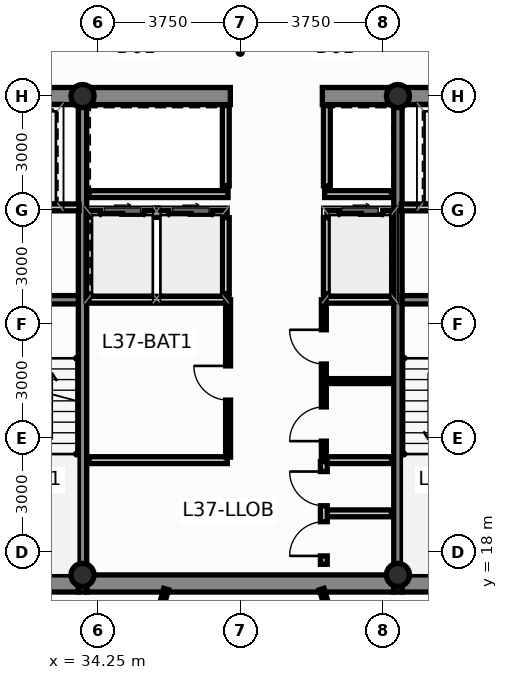
"""IFC4 building model, lengths in metres.
Left out: names, types, materials, properties, quantities, classifications, styles, units other than length and angle.
Written with IfcOpenShell. Run it as: python <this file> out.ifc"""

import sys

from ifc_helpers import new_model, si_unit, direction, frame, frame_2d, origin, origin_2d, place, context, subcontext, project, spatial, rectangle, hollow_circle, extrude, source, transform, mapped, element, fill, save


model = new_model("IFC4")
c1 = context("Model", 3, precision=1e-05, world=origin(), true_north=direction((0.0, 1.0)))
c2 = subcontext(c1, "Body", "Model", "MODEL_VIEW")
j1 = project(units=[si_unit("LENGTHUNIT", "METRE"), si_unit("PLANEANGLEUNIT", "RADIAN")], contexts=[c1])
p1 = place(None, origin())
s1 = spatial("IfcSite", under=j1, at=p1, CompositionType="ELEMENT")
p2 = place(p1, origin())
s2 = spatial("IfcBuilding", under=s1, at=p2, CompositionType="ELEMENT")
p3 = place(p2, frame((0.0, 0.0, 142.75)))
s3 = spatial("IfcBuildingStorey", under=s2, at=p3, CompositionType="ELEMENT", Elevation=142.75)
m1 = source(origin(), c2, "Body", "SweptSolid", [
    extrude(hollow_circle(Radius=0.305, WallThickness=0.025, at=origin_2d()), origin(), (0.0, 0.0, 1.0), 3.65),
])
for number, where, z_axis, x_axis in (
    (1, (33.85, 17.4, 0.0), (0.0, 0.0, 1.0), (1.0, 0.0, 0.0)),
    (2, (42.15, 17.4, 0.0), (0.0, 0.0, 1.0), (1.0, 0.0, 0.0)),
    (3, (33.85, 30.0, 0.0), (0.0, 0.0, 1.0), (1.0, 0.0, 0.0)),
    (4, (42.15, 30.0, 0.0), (0.0, 0.0, 1.0), (1.0, 0.0, 0.0)),
):
    element("IfcColumn", number, at=place(p3, frame(where, z_axis=z_axis, x_axis=x_axis)), inside=s3, PredefinedType="COLUMN", context=c2, shape_type="MappedRepresentation", body=[
        mapped(m1, transform((0.0, 0.0, 0.0), scale=1.0)),
    ])
p4 = place(p3, frame((30.84, 17.175, 0.0), z_axis=(0.0, 0.0, 1.0), x_axis=(1.0, 0.0, 0.0)))
e5 = element("IfcWall", 5, at=p4, inside=s3, PredefinedType="SHEAR", context=c2, shape_type="SweptSolid", body=[
    extrude(rectangle(XDim=2.9, YDim=0.45, at=frame_2d((1.45, 0.0))), origin(), (0.0, 0.0, 1.0), 3.65),
])
p5 = place(p3, frame((33.96, 17.175, 0.0), z_axis=(0.0, 0.0, 1.0), x_axis=(1.0, 0.0, 0.0)))
e6 = element("IfcWall", 6, at=p5, inside=s3, PredefinedType="SHEAR", context=c2, shape_type="SweptSolid", body=[
    extrude(rectangle(XDim=8.08, YDim=0.45, at=frame_2d((4.04, 0.0))), origin(), (0.0, 0.0, 1.0), 3.65),
])
for number, where, z_axis, x_axis in (
    (7, (42.26, 17.175, 0.0), (0.0, 0.0, 1.0), (1.0, 0.0, 0.0)),
    (8, (30.84, 30.0, 0.0), (0.0, 0.0, 1.0), (1.0, 0.0, 0.0)),
):
    element("IfcWall", number, at=place(p3, frame(where, z_axis=z_axis, x_axis=x_axis)), inside=s3, PredefinedType="SHEAR", context=c2, shape_type="SweptSolid", body=[
        extrude(rectangle(XDim=2.9, YDim=0.45, at=frame_2d((1.45, 0.0))), origin(), (0.0, 0.0, 1.0), 3.65),
    ])
p6 = place(p3, frame((33.96, 30.0, 0.0), z_axis=(0.0, 0.0, 1.0), x_axis=(1.0, 0.0, 0.0)))
e9 = element("IfcWall", 9, at=p6, inside=s3, PredefinedType="SHEAR", context=c2, shape_type="SweptSolid", body=[
    extrude(rectangle(XDim=3.78, YDim=0.45, at=frame_2d((1.89, 0.0))), origin(), (0.0, 0.0, 1.0), 3.65),
])
p7 = place(p3, frame((40.16, 30.0, 0.0), z_axis=(0.0, 0.0, 1.0), x_axis=(1.0, 0.0, 0.0)))
e10 = element("IfcWall", 10, at=p7, inside=s3, PredefinedType="SHEAR", context=c2, shape_type="SweptSolid", body=[
    extrude(rectangle(XDim=1.88, YDim=0.45, at=frame_2d((0.94, 0.0))), origin(), (0.0, 0.0, 1.0), 3.65),
])
p8 = place(p3, frame((42.26, 30.0, 0.0), z_axis=(0.0, 0.0, 1.0), x_axis=(1.0, 0.0, 0.0)))
e11 = element("IfcWall", 11, at=p8, inside=s3, PredefinedType="SHEAR", context=c2, shape_type="SweptSolid", body=[
    extrude(rectangle(XDim=2.9, YDim=0.45, at=frame_2d((1.45, 0.0))), origin(), (0.0, 0.0, 1.0), 3.65),
])
for number, where, z_axis, x_axis in (
    (12, (33.85, 16.95, 0.0), (0.0, 0.0, 1.0), (0.0, 1.0, 0.0)),
    (13, (42.15, 16.95, 0.0), (0.0, 0.0, 1.0), (0.0, 1.0, 0.0)),
):
    element("IfcWall", number, at=place(p3, frame(where, z_axis=z_axis, x_axis=x_axis)), inside=s3, PredefinedType="SHEAR", context=c2, shape_type="SweptSolid", body=[
        extrude(rectangle(XDim=13.275, YDim=0.22, at=frame_2d((6.638, 0.0))), origin(), (0.0, 0.0, 1.0), 3.65),
    ])
for number, where, z_axis, x_axis in (
    (14, (30.84, 24.64, 0.0), (0.0, 0.0, 1.0), (1.0, 0.0, 0.0)),
    (15, (42.26, 24.64, 0.0), (0.0, 0.0, 1.0), (1.0, 0.0, 0.0)),
):
    element("IfcWall", number, at=place(p3, frame(where, z_axis=z_axis, x_axis=x_axis)), inside=s3, PredefinedType="SHEAR", context=c2, shape_type="SweptSolid", body=[
        extrude(rectangle(XDim=2.9, YDim=0.22, at=frame_2d((1.45, 0.0))), origin(), (0.0, 0.0, 1.0), 3.65),
    ])
p9 = place(p3, frame((34.02, 26.9, 0.0), z_axis=(0.0, 0.0, 1.0), x_axis=(1.0, 0.0, 0.0)))
e16 = element("IfcWall", 16, at=p9, inside=s3, PredefinedType="PARTITIONING", context=c2, shape_type="SweptSolid", body=[
    extrude(rectangle(XDim=3.6, YDim=0.18, at=frame_2d((1.8, 0.0))), origin(), (0.0, 0.0, 1.0), 3.4),
])
p10 = place(p9, frame((0.3, 0.0, 0.0)))
e17 = element("IfcOpeningElement", 17, at=p10, cuts=e16, PredefinedType="OPENING", context=c2, shape_type="SweptSolid", body=[
    extrude(rectangle(XDim=1.15, YDim=2.2, at=frame_2d((0.575, 1.1))), frame((0.0, 0.102, 0.0), z_axis=(0.0, -1.0, 0.0), x_axis=(1.0, 0.0, 0.0)), (0.0, 0.0, 1.0), 0.204),
])
p11 = place(p9, frame((2.1, 0.0, 0.0)))
e18 = element("IfcOpeningElement", 18, at=p11, cuts=e16, PredefinedType="OPENING", context=c2, shape_type="SweptSolid", body=[
    extrude(rectangle(XDim=1.15, YDim=2.2, at=frame_2d((0.575, 1.1))), frame((0.0, 0.102, 0.0), z_axis=(0.0, -1.0, 0.0), x_axis=(1.0, 0.0, 0.0)), (0.0, 0.0, 1.0), 0.204),
])
p12 = place(p3, frame((40.28, 26.9, 0.0), z_axis=(0.0, 0.0, 1.0), x_axis=(1.0, 0.0, 0.0)))
e19 = element("IfcWall", 19, at=p12, inside=s3, PredefinedType="PARTITIONING", context=c2, shape_type="SweptSolid", body=[
    extrude(rectangle(XDim=1.7, YDim=0.18, at=frame_2d((0.85, 0.0))), origin(), (0.0, 0.0, 1.0), 3.4),
])
p13 = place(p12, frame((0.32, 0.0, 0.0)))
e20 = element("IfcOpeningElement", 20, at=p13, cuts=e19, PredefinedType="OPENING", context=c2, shape_type="SweptSolid", body=[
    extrude(rectangle(XDim=1.15, YDim=2.2, at=frame_2d((0.575, 1.1))), frame((0.0, 0.102, 0.0), z_axis=(0.0, -1.0, 0.0), x_axis=(1.0, 0.0, 0.0)), (0.0, 0.0, 1.0), 0.204),
])
for number, where, z_axis, x_axis in (
    (21, (37.62, 24.8, 0.0), (0.0, 0.0, 1.0), (0.0, 1.0, 0.0)),
    (22, (40.28, 24.8, 0.0), (0.0, 0.0, 1.0), (0.0, 1.0, 0.0)),
):
    element("IfcWall", number, at=place(p3, frame(where, z_axis=z_axis, x_axis=x_axis)), inside=s3, PredefinedType="PARTITIONING", context=c2, shape_type="SweptSolid", body=[
        extrude(rectangle(XDim=2.0, YDim=0.18, at=frame_2d((1.0, 0.0))), origin(), (0.0, 0.0, 1.0), 3.4),
    ])
p14 = place(p3, frame((34.02, 24.64, 0.0), z_axis=(0.0, 0.0, 1.0), x_axis=(1.0, 0.0, 0.0)))
e23 = element("IfcWall", 23, at=p14, inside=s3, PredefinedType="PARTITIONING", context=c2, shape_type="SweptSolid", body=[
    extrude(rectangle(XDim=3.68, YDim=0.18, at=frame_2d((1.84, 0.0))), origin(), (0.0, 0.0, 1.0), 3.4),
])
p15 = place(p3, frame((40.2, 24.64, 0.0), z_axis=(0.0, 0.0, 1.0), x_axis=(1.0, 0.0, 0.0)))
e24 = element("IfcWall", 24, at=p15, inside=s3, PredefinedType="PARTITIONING", context=c2, shape_type="SweptSolid", body=[
    extrude(rectangle(XDim=1.78, YDim=0.18, at=frame_2d((0.89, 0.0))), origin(), (0.0, 0.0, 1.0), 3.4),
])
p16 = place(p3, frame((34.02, 27.42, 0.0), z_axis=(0.0, 0.0, 1.0), x_axis=(1.0, 0.0, 0.0)))
e25 = element("IfcWall", 25, at=p16, inside=s3, PredefinedType="PARTITIONING", context=c2, shape_type="SweptSolid", body=[
    extrude(rectangle(XDim=3.66, YDim=0.18, at=frame_2d((1.83, 0.0))), origin(), (0.0, 0.0, 1.0), 3.4),
])
p17 = place(p3, frame((40.22, 27.42, 0.0), z_axis=(0.0, 0.0, 1.0), x_axis=(1.0, 0.0, 0.0)))
e26 = element("IfcWall", 26, at=p17, inside=s3, PredefinedType="PARTITIONING", context=c2, shape_type="SweptSolid", body=[
    extrude(rectangle(XDim=1.76, YDim=0.18, at=frame_2d((0.88, 0.0))), origin(), (0.0, 0.0, 1.0), 3.4),
])
for number, where, z_axis, x_axis in (
    (27, (37.62, 27.64, 0.0), (0.0, 0.0, 1.0), (0.0, 1.0, 0.0)),
    (28, (40.28, 27.64, 0.0), (0.0, 0.0, 1.0), (0.0, 1.0, 0.0)),
):
    element("IfcWall", number, at=place(p3, frame(where, z_axis=z_axis, x_axis=x_axis)), inside=s3, PredefinedType="PARTITIONING", context=c2, shape_type="SweptSolid", body=[
        extrude(rectangle(XDim=2.11, YDim=0.18, at=frame_2d((1.055, 0.0))), origin(), (0.0, 0.0, 1.0), 3.4),
    ])
for number, where, z_axis, x_axis in (
    (29, (30.86, 27.07, 0.0), (0.0, 0.0, 1.0), (1.0, 0.0, 0.0)),
    (30, (42.24, 27.07, 0.0), (0.0, 0.0, 1.0), (1.0, 0.0, 0.0)),
):
    element("IfcWall", number, at=place(p3, frame(where, z_axis=z_axis, x_axis=x_axis)), inside=s3, PredefinedType="PARTITIONING", context=c2, shape_type="SweptSolid", body=[
        extrude(rectangle(XDim=2.9, YDim=0.18, at=frame_2d((1.45, 0.0))), origin(), (0.0, 0.0, 1.0), 3.4),
    ])
p18 = place(p3, frame((34.02, 20.42, 0.0), z_axis=(0.0, 0.0, 1.0), x_axis=(1.0, 0.0, 0.0)))
e31 = element("IfcWall", 31, at=p18, inside=s3, PredefinedType="PARTITIONING", context=c2, shape_type="SweptSolid", body=[
    extrude(rectangle(XDim=3.64, YDim=0.18, at=frame_2d((1.82, 0.0))), origin(), (0.0, 0.0, 1.0), 3.4),
])
p19 = place(p3, frame((40.22, 20.42, 0.0), z_axis=(0.0, 0.0, 1.0), x_axis=(1.0, 0.0, 0.0)))
e32 = element("IfcWall", 32, at=p19, inside=s3, PredefinedType="PARTITIONING", context=c2, shape_type="SweptSolid", body=[
    extrude(rectangle(XDim=1.76, YDim=0.18, at=frame_2d((0.88, 0.0))), origin(), (0.0, 0.0, 1.0), 3.4),
])
p20 = place(p3, frame((40.28, 22.5, 0.0), z_axis=(0.0, 0.0, 1.0), x_axis=(1.0, 0.0, 0.0)))
e33 = element("IfcWall", 33, at=p20, inside=s3, PredefinedType="PARTITIONING", context=c2, shape_type="SweptSolid", body=[
    extrude(rectangle(XDim=1.7, YDim=0.13, at=frame_2d((0.85, 0.0))), origin(), (0.0, 0.0, 1.0), 3.4),
])
p21 = place(p3, frame((37.68, 20.5, 0.0), z_axis=(0.0, 0.0, 1.0), x_axis=(0.0, 1.0, 0.0)))
e34 = element("IfcWall", 34, at=p21, inside=s3, PredefinedType="PARTITIONING", context=c2, shape_type="SweptSolid", body=[
    extrude(rectangle(XDim=4.14, YDim=0.13, at=frame_2d((2.07, 0.0))), origin(), (0.0, 0.0, 1.0), 3.4),
])
p22 = place(p21, frame((1.5, 0.0, 0.0)))
e35 = element("IfcOpeningElement", 35, at=p22, cuts=e34, PredefinedType="OPENING", context=c2, shape_type="SweptSolid", body=[
    extrude(rectangle(XDim=0.9, YDim=2.1, at=frame_2d((0.45, 1.05))), frame((0.0, 0.077, 0.0), z_axis=(0.0, -1.0, 0.0), x_axis=(1.0, 0.0, 0.0)), (0.0, 0.0, 1.0), 0.154),
])
p23 = place(p3, frame((40.2, 20.5, 0.0), z_axis=(0.0, 0.0, 1.0), x_axis=(0.0, 1.0, 0.0)))
e36 = element("IfcWall", 36, at=p23, inside=s3, PredefinedType="PARTITIONING", context=c2, shape_type="SweptSolid", body=[
    extrude(rectangle(XDim=4.14, YDim=0.13, at=frame_2d((2.07, 0.0))), origin(), (0.0, 0.0, 1.0), 3.4),
])
p24 = place(p23, frame((0.42, 0.0, 0.0)))
e37 = element("IfcOpeningElement", 37, at=p24, cuts=e36, PredefinedType="OPENING", context=c2, shape_type="SweptSolid", body=[
    extrude(rectangle(XDim=0.9, YDim=2.1, at=frame_2d((0.45, 1.05))), frame((0.0, 0.077, 0.0), z_axis=(0.0, -1.0, 0.0), x_axis=(1.0, 0.0, 0.0)), (0.0, 0.0, 1.0), 0.154),
])
p25 = place(p23, frame((2.45, 0.0, 0.0)))
e38 = element("IfcOpeningElement", 38, at=p25, cuts=e36, PredefinedType="OPENING", context=c2, shape_type="SweptSolid", body=[
    extrude(rectangle(XDim=0.9, YDim=2.1, at=frame_2d((0.45, 1.05))), frame((0.0, 0.077, 0.0), z_axis=(0.0, -1.0, 0.0), x_axis=(1.0, 0.0, 0.0)), (0.0, 0.0, 1.0), 0.154),
])
p26 = place(p3, frame((40.28, 19.02, 0.0), z_axis=(0.0, 0.0, 1.0), x_axis=(1.0, 0.0, 0.0)))
e39 = element("IfcWall", 39, at=p26, inside=s3, PredefinedType="PARTITIONING", context=c2, shape_type="SweptSolid", body=[
    extrude(rectangle(XDim=1.7, YDim=0.18, at=frame_2d((0.85, 0.0))), origin(), (0.0, 0.0, 1.0), 3.4),
])
p27 = place(p3, frame((40.2, 17.68, 0.0), z_axis=(0.0, 0.0, 1.0), x_axis=(0.0, 1.0, 0.0)))
e40 = element("IfcWall", 40, at=p27, inside=s3, PredefinedType="PARTITIONING", context=c2, shape_type="SweptSolid", body=[
    extrude(rectangle(XDim=2.7, YDim=0.18, at=frame_2d((1.35, 0.0))), origin(), (0.0, 0.0, 1.0), 3.4),
])
p28 = place(p27, frame((0.22, 0.0, 0.0)))
e41 = element("IfcOpeningElement", 41, at=p28, cuts=e40, PredefinedType="OPENING", context=c2, shape_type="SweptSolid", body=[
    extrude(rectangle(XDim=0.9, YDim=2.1, at=frame_2d((0.45, 1.05))), frame((0.0, 0.102, 0.0), z_axis=(0.0, -1.0, 0.0), x_axis=(1.0, 0.0, 0.0)), (0.0, 0.0, 1.0), 0.204),
])
p29 = place(p27, frame((1.54, 0.0, 0.0)))
e42 = element("IfcOpeningElement", 42, at=p29, cuts=e40, PredefinedType="OPENING", context=c2, shape_type="SweptSolid", body=[
    extrude(rectangle(XDim=0.9, YDim=2.1, at=frame_2d((0.45, 1.05))), frame((0.0, 0.102, 0.0), z_axis=(0.0, -1.0, 0.0), x_axis=(1.0, 0.0, 0.0)), (0.0, 0.0, 1.0), 0.204),
])
p30 = place(p3, frame((40.142, 17.028, 0.0), z_axis=(0.0, 0.0, 1.0), x_axis=(0.293775711931, -0.955874380387, 0.0)))
e43 = element("IfcWall", 43, at=p30, inside=s3, PredefinedType="PARTITIONING", context=c2, shape_type="SweptSolid", body=[
    extrude(rectangle(XDim=11.23, YDim=0.13, at=frame_2d((5.615, 0.0))), origin(), (0.0, 0.0, 1.0), 3.4),
])
p31 = place(p30, frame((5.184, 0.0, 0.0)))
e44 = element("IfcOpeningElement", 44, at=p31, cuts=e43, PredefinedType="OPENING", context=c2, shape_type="SweptSolid", body=[
    extrude(rectangle(XDim=0.96, YDim=2.15, at=frame_2d((0.48, 1.075))), frame((0.0, 0.077, 0.0), z_axis=(0.0, -1.0, 0.0), x_axis=(1.0, 0.0, 0.0)), (0.0, 0.0, 1.0), 0.154),
])
p32 = place(p3, frame((33.068, 6.379, 0.0), z_axis=(0.0, 0.0, 1.0), x_axis=(0.269684788435, 0.962948656413, 0.0)))
e45 = element("IfcWall", 45, at=p32, inside=s3, PredefinedType="PARTITIONING", context=c2, shape_type="SweptSolid", body=[
    extrude(rectangle(XDim=11.059, YDim=0.13, at=frame_2d((5.529, 0.0))), origin(), (0.0, 0.0, 1.0), 3.4),
])
p33 = place(p32, frame((5.101, 0.0, 0.0)))
e46 = element("IfcOpeningElement", 46, at=p33, cuts=e45, PredefinedType="OPENING", context=c2, shape_type="SweptSolid", body=[
    extrude(rectangle(XDim=0.96, YDim=2.15, at=frame_2d((0.48, 1.075))), frame((0.0, 0.077, 0.0), z_axis=(0.0, -1.0, 0.0), x_axis=(1.0, 0.0, 0.0)), (0.0, 0.0, 1.0), 0.154),
])
p34 = place(p10, origin())
e47 = element("IfcDoor", 47, at=p34, inside=s3, OperationType="SLIDING_TO_LEFT", PredefinedType="DOOR", context=c2, shape_type="SweptSolid", body=[
    extrude(rectangle(XDim=1.15, YDim=2.2, at=frame_2d((0.575, 1.1))), frame((0.0, 0.025, 0.0), z_axis=(0.0, -1.0, 0.0), x_axis=(1.0, 0.0, 0.0)), (0.0, 0.0, 1.0), 0.05),
])
fill(e17, e47)
p35 = place(p11, origin())
e48 = element("IfcDoor", 48, at=p35, inside=s3, OperationType="SLIDING_TO_RIGHT", PredefinedType="DOOR", context=c2, shape_type="SweptSolid", body=[
    extrude(rectangle(XDim=1.15, YDim=2.2, at=frame_2d((0.575, 1.1))), frame((0.0, 0.025, 0.0), z_axis=(0.0, -1.0, 0.0), x_axis=(1.0, 0.0, 0.0)), (0.0, 0.0, 1.0), 0.05),
])
fill(e18, e48)
p36 = place(p13, origin())
e49 = element("IfcDoor", 49, at=p36, inside=s3, OperationType="SLIDING_TO_LEFT", PredefinedType="DOOR", context=c2, shape_type="SweptSolid", body=[
    extrude(rectangle(XDim=1.15, YDim=2.2, at=frame_2d((0.575, 1.1))), frame((0.0, 0.025, 0.0), z_axis=(0.0, -1.0, 0.0), x_axis=(1.0, 0.0, 0.0)), (0.0, 0.0, 1.0), 0.05),
])
fill(e20, e49)
p37 = place(p22, origin())
e50 = element("IfcDoor", 50, at=p37, inside=s3, OperationType="SINGLE_SWING_RIGHT", PredefinedType="DOOR", context=c2, shape_type="SweptSolid", body=[
    extrude(rectangle(XDim=0.9, YDim=2.1, at=frame_2d((0.45, 1.05))), frame((0.0, 0.025, 0.0), z_axis=(0.0, -1.0, 0.0), x_axis=(1.0, 0.0, 0.0)), (0.0, 0.0, 1.0), 0.05),
])
fill(e35, e50)
p38 = place(p24, origin())
e51 = element("IfcDoor", 51, at=p38, inside=s3, OperationType="SINGLE_SWING_LEFT", PredefinedType="DOOR", context=c2, shape_type="SweptSolid", body=[
    extrude(rectangle(XDim=0.9, YDim=2.1, at=frame_2d((0.45, 1.05))), frame((0.0, 0.025, 0.0), z_axis=(0.0, -1.0, 0.0), x_axis=(1.0, 0.0, 0.0)), (0.0, 0.0, 1.0), 0.05),
])
fill(e37, e51)
p39 = place(p25, origin())
e52 = element("IfcDoor", 52, at=p39, inside=s3, OperationType="SINGLE_SWING_RIGHT", PredefinedType="DOOR", context=c2, shape_type="SweptSolid", body=[
    extrude(rectangle(XDim=0.9, YDim=2.1, at=frame_2d((0.45, 1.05))), frame((0.0, 0.025, 0.0), z_axis=(0.0, -1.0, 0.0), x_axis=(1.0, 0.0, 0.0)), (0.0, 0.0, 1.0), 0.05),
])
fill(e38, e52)
p40 = place(p28, origin())
e53 = element("IfcDoor", 53, at=p40, inside=s3, OperationType="SINGLE_SWING_LEFT", PredefinedType="DOOR", context=c2, shape_type="SweptSolid", body=[
    extrude(rectangle(XDim=0.9, YDim=2.1, at=frame_2d((0.45, 1.05))), frame((0.0, 0.025, 0.0), z_axis=(0.0, -1.0, 0.0), x_axis=(1.0, 0.0, 0.0)), (0.0, 0.0, 1.0), 0.05),
])
fill(e41, e53)
p41 = place(p29, origin())
e54 = element("IfcDoor", 54, at=p41, inside=s3, OperationType="SINGLE_SWING_RIGHT", PredefinedType="DOOR", context=c2, shape_type="SweptSolid", body=[
    extrude(rectangle(XDim=0.9, YDim=2.1, at=frame_2d((0.45, 1.05))), frame((0.0, 0.025, 0.0), z_axis=(0.0, -1.0, 0.0), x_axis=(1.0, 0.0, 0.0)), (0.0, 0.0, 1.0), 0.05),
])
fill(e42, e54)
save(model, sys.argv[1])
